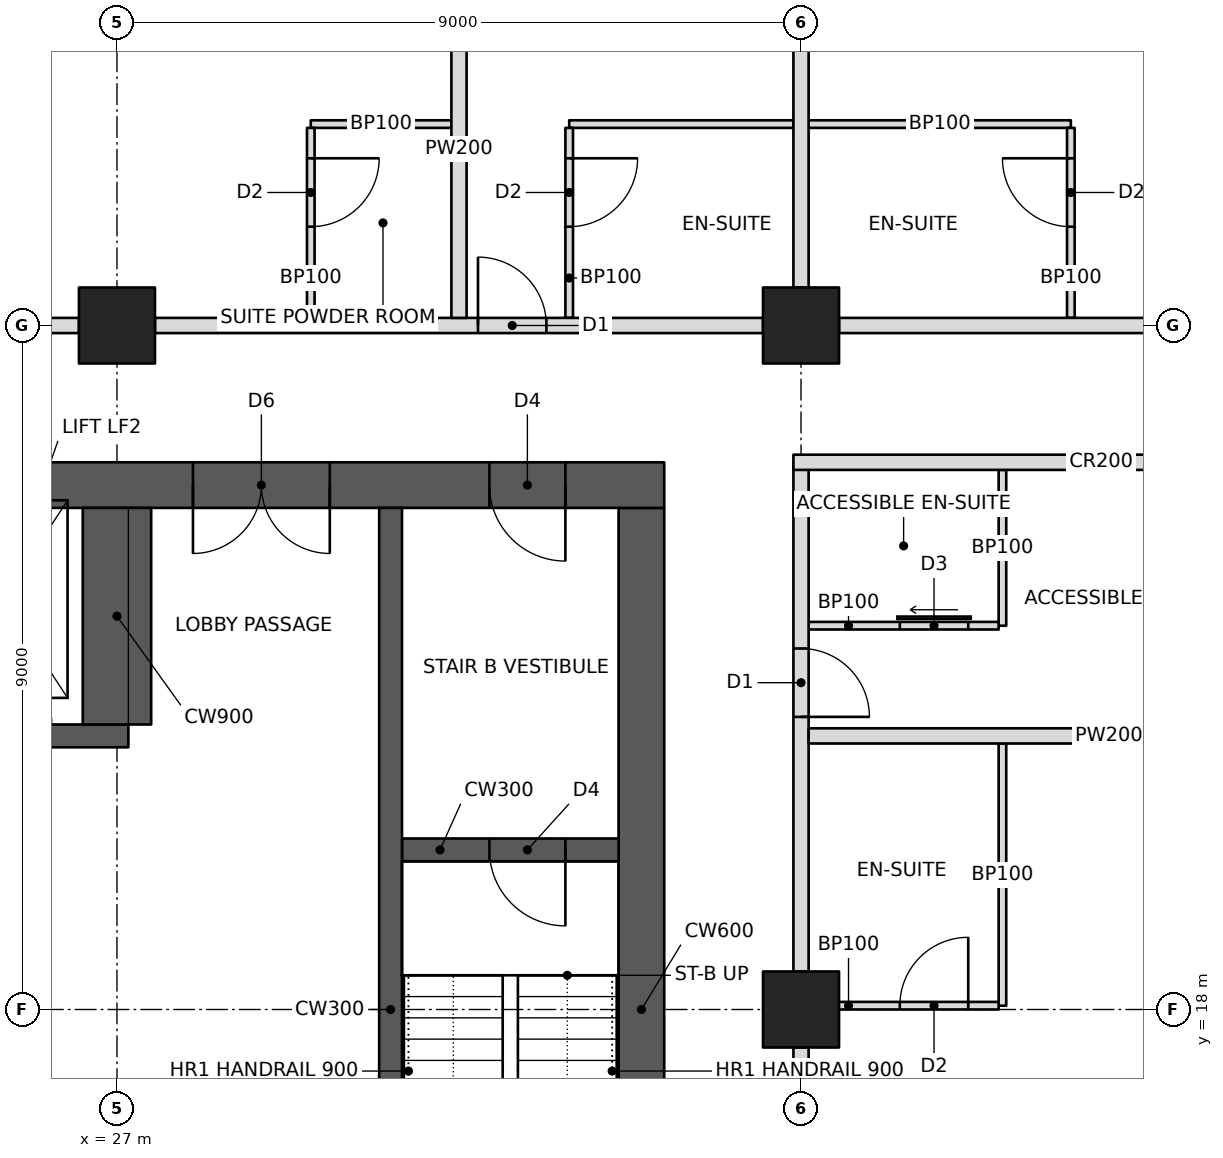
"""IFC4 building model, lengths in metres.
Left out: names, types, materials, properties, quantities, classifications, styles, units other than length and angle.
Written with IfcOpenShell. Run it as: python <this file> out.ifc"""

import sys

from ifc_helpers import new_model, si_unit, direction, frame, frame_2d, origin, origin_2d, place, context, subcontext, project, spatial, rectangle, hollow_rectangle, extrude, element, fill, save


model = new_model("IFC4")
c1 = context("Model", 3, precision=1e-05, world=origin(), true_north=direction((0.0, 1.0)))
c2 = subcontext(c1, "Body", "Model", "MODEL_VIEW")
j1 = project(units=[si_unit("LENGTHUNIT", "METRE"), si_unit("PLANEANGLEUNIT", "RADIAN")], contexts=[c1])
p1 = place(None, origin())
s1 = spatial("IfcSite", under=j1, at=p1, CompositionType="ELEMENT")
p2 = place(p1, origin())
s2 = spatial("IfcBuilding", under=s1, at=p2, CompositionType="ELEMENT")
p3 = place(p2, frame((0.0, 0.0, 152.0)))
s3 = spatial("IfcBuildingStorey", under=s2, at=p3, CompositionType="ELEMENT", Elevation=152.0)
for number, where, z_axis, x_axis in (
    (1, (27.0, 27.0, 0.0), (0.0, 0.0, 1.0), (1.0, 0.0, 0.0)),
    (2, (36.0, 18.0, 0.0), (0.0, 0.0, 1.0), (0.0, 1.0, 0.0)),
    (3, (36.0, 27.0, 0.0), (0.0, 0.0, 1.0), (1.0, 0.0, 0.0)),
):
    element("IfcColumn", number, at=place(p3, frame(where, z_axis=z_axis, x_axis=x_axis)), inside=s3, PredefinedType="COLUMN", context=c2, shape_type="SweptSolid", body=[
        extrude(hollow_rectangle(XDim=1.0, YDim=1.0, WallThickness=0.1, at=origin_2d()), origin(), (0.0, 0.0, 1.0), 3.4),
    ])
p4 = place(p3, frame((10.8, 24.9, 0.0), z_axis=(0.0, 0.0, 1.0), x_axis=(1.0, 0.0, 0.0)))
e4 = element("IfcWall", 4, at=p4, inside=s3, PredefinedType="SHEAR", context=c2, shape_type="SweptSolid", body=[
    extrude(rectangle(XDim=23.4, YDim=0.6, at=frame_2d((11.7, 0.0))), origin(), (0.0, 0.0, 1.0), 3.4),
])
p5 = place(p4, frame((17.2, 0.0, 0.0)))
e5 = element("IfcOpeningElement", 5, at=p5, cuts=e4, PredefinedType="OPENING", context=c2, shape_type="SweptSolid", body=[
    extrude(rectangle(XDim=1.8, YDim=2.1, at=frame_2d((0.9, 1.05))), frame((0.0, 0.31, 0.0), z_axis=(0.0, -1.0, 0.0), x_axis=(1.0, 0.0, 0.0)), (0.0, 0.0, 1.0), 0.62),
])
p6 = place(p4, frame((21.1, 0.0, 0.0)))
e6 = element("IfcOpeningElement", 6, at=p6, cuts=e4, PredefinedType="OPENING", context=c2, shape_type="SweptSolid", body=[
    extrude(rectangle(XDim=1.0, YDim=2.1, at=frame_2d((0.5, 1.05))), frame((0.0, 0.31, 0.0), z_axis=(0.0, -1.0, 0.0), x_axis=(1.0, 0.0, 0.0)), (0.0, 0.0, 1.0), 0.62),
])
p7 = place(p3, frame((33.9, 11.4, 0.0), z_axis=(0.0, 0.0, 1.0), x_axis=(0.0, 1.0, 0.0)))
e7 = element("IfcWall", 7, at=p7, inside=s3, PredefinedType="SHEAR", context=c2, shape_type="SweptSolid", body=[
    extrude(rectangle(XDim=13.2, YDim=0.6, at=frame_2d((6.6, 0.0))), origin(), (0.0, 0.0, 1.0), 3.4),
])
p8 = place(p3, frame((18.15, 21.6, 0.0), z_axis=(0.0, 0.0, 1.0), x_axis=(1.0, 0.0, 0.0)))
e8 = element("IfcWall", 8, at=p8, inside=s3, PredefinedType="SHEAR", context=c2, shape_type="SweptSolid", body=[
    extrude(rectangle(XDim=9.0, YDim=0.3, at=frame_2d((4.5, 0.0))), origin(), (0.0, 0.0, 1.0), 3.4),
])
p9 = place(p8, frame((6.75, 0.0, 0.0)))
e9 = element("IfcOpeningElement", 9, at=p9, cuts=e8, PredefinedType="OPENING", context=c2, shape_type="SweptSolid", body=[
    extrude(rectangle(XDim=1.2, YDim=2.1, at=frame_2d((0.6, 1.05))), frame((0.0, 0.16, 0.0), z_axis=(0.0, -1.0, 0.0), x_axis=(1.0, 0.0, 0.0)), (0.0, 0.0, 1.0), 0.32),
])
p10 = place(p3, frame((27.0, 21.75, 0.0), z_axis=(0.0, 0.0, 1.0), x_axis=(0.0, 1.0, 0.0)))
e10 = element("IfcWall", 10, at=p10, inside=s3, PredefinedType="SHEAR", context=c2, shape_type="SweptSolid", body=[
    extrude(rectangle(XDim=2.85, YDim=0.9, at=frame_2d((1.425, 0.0))), origin(), (0.0, 0.0, 1.0), 3.4),
])
p11 = place(p3, frame((30.6, 11.4, 0.0), z_axis=(0.0, 0.0, 1.0), x_axis=(0.0, 1.0, 0.0)))
e11 = element("IfcWall", 11, at=p11, inside=s3, PredefinedType="SHEAR", context=c2, shape_type="SweptSolid", body=[
    extrude(rectangle(XDim=13.2, YDim=0.3, at=frame_2d((6.6, 0.0))), origin(), (0.0, 0.0, 1.0), 3.4),
])
p12 = place(p3, frame((30.75, 20.1, 0.0), z_axis=(0.0, 0.0, 1.0), x_axis=(1.0, 0.0, 0.0)))
e12 = element("IfcWall", 12, at=p12, inside=s3, PredefinedType="SHEAR", context=c2, shape_type="SweptSolid", body=[
    extrude(rectangle(XDim=2.85, YDim=0.3, at=frame_2d((1.425, 0.0))), origin(), (0.0, 0.0, 1.0), 3.4),
])
p13 = place(p12, frame((1.15, 0.0, 0.0)))
e13 = element("IfcOpeningElement", 13, at=p13, cuts=e12, PredefinedType="OPENING", context=c2, shape_type="SweptSolid", body=[
    extrude(rectangle(XDim=1.0, YDim=2.1, at=frame_2d((0.5, 1.05))), frame((0.0, 0.16, 0.0), z_axis=(0.0, -1.0, 0.0), x_axis=(1.0, 0.0, 0.0)), (0.0, 0.0, 1.0), 0.32),
])
p14 = place(p3, frame((18.5, 27.0, 0.0), z_axis=(0.0, 0.0, 1.0), x_axis=(1.0, 0.0, 0.0)))
e14 = element("IfcWall", 14, at=p14, inside=s3, PredefinedType="PARTITIONING", context=c2, shape_type="SweptSolid", body=[
    extrude(rectangle(XDim=8.0, YDim=0.2, at=frame_2d((4.0, 0.0))), origin(), (0.0, 0.0, 1.0), 2.21),
])
p15 = place(p14, frame((2.85, 0.0, 0.0)))
e15 = element("IfcOpeningElement", 15, at=p15, cuts=e14, PredefinedType="OPENING", context=c2, shape_type="SweptSolid", body=[
    extrude(rectangle(XDim=0.9, YDim=2.1, at=frame_2d((0.45, 1.05))), frame((0.0, 0.11, 0.0), z_axis=(0.0, -1.0, 0.0), x_axis=(1.0, 0.0, 0.0)), (0.0, 0.0, 1.0), 0.22),
])
p16 = place(p14, frame((4.25, 0.0, 0.0)))
e16 = element("IfcOpeningElement", 16, at=p16, cuts=e14, PredefinedType="OPENING", context=c2, shape_type="SweptSolid", body=[
    extrude(rectangle(XDim=0.9, YDim=2.1, at=frame_2d((0.45, 1.05))), frame((0.0, 0.11, 0.0), z_axis=(0.0, -1.0, 0.0), x_axis=(1.0, 0.0, 0.0)), (0.0, 0.0, 1.0), 0.22),
])
p17 = place(p3, frame((27.5, 27.0, 0.0), z_axis=(0.0, 0.0, 1.0), x_axis=(1.0, 0.0, 0.0)))
e17 = element("IfcWall", 17, at=p17, inside=s3, PredefinedType="PARTITIONING", context=c2, shape_type="SweptSolid", body=[
    extrude(rectangle(XDim=8.0, YDim=0.2, at=frame_2d((4.0, 0.0))), origin(), (0.0, 0.0, 1.0), 2.21),
])
p18 = place(p17, frame((4.25, 0.0, 0.0)))
e18 = element("IfcOpeningElement", 18, at=p18, cuts=e17, PredefinedType="OPENING", context=c2, shape_type="SweptSolid", body=[
    extrude(rectangle(XDim=0.9, YDim=2.1, at=frame_2d((0.45, 1.05))), frame((0.0, 0.11, 0.0), z_axis=(0.0, -1.0, 0.0), x_axis=(1.0, 0.0, 0.0)), (0.0, 0.0, 1.0), 0.22),
])
p19 = place(p3, frame((36.5, 27.0, 0.0), z_axis=(0.0, 0.0, 1.0), x_axis=(1.0, 0.0, 0.0)))
e19 = element("IfcWall", 19, at=p19, inside=s3, PredefinedType="PARTITIONING", context=c2, shape_type="SweptSolid", body=[
    extrude(rectangle(XDim=7.5, YDim=0.2, at=frame_2d((3.75, 0.0))), origin(), (0.0, 0.0, 1.0), 2.21),
])
p20 = place(p19, frame((6.35, 0.0, 0.0)))
e20 = element("IfcOpeningElement", 20, at=p20, cuts=e19, PredefinedType="OPENING", context=c2, shape_type="SweptSolid", body=[
    extrude(rectangle(XDim=0.9, YDim=2.1, at=frame_2d((0.45, 1.05))), frame((0.0, 0.11, 0.0), z_axis=(0.0, -1.0, 0.0), x_axis=(1.0, 0.0, 0.0)), (0.0, 0.0, 1.0), 0.22),
])
p21 = place(p3, frame((36.0, 10.8, 0.0), z_axis=(0.0, 0.0, 1.0), x_axis=(0.0, 1.0, 0.0)))
e21 = element("IfcWall", 21, at=p21, inside=s3, PredefinedType="PARTITIONING", context=c2, shape_type="SweptSolid", body=[
    extrude(rectangle(XDim=6.7, YDim=0.2, at=frame_2d((3.35, 0.0))), origin(), (0.0, 0.0, 1.0), 2.21),
])
p22 = place(p21, frame((0.25, 0.0, 0.0)))
e22 = element("IfcOpeningElement", 22, at=p22, cuts=e21, PredefinedType="OPENING", context=c2, shape_type="SweptSolid", body=[
    extrude(rectangle(XDim=0.9, YDim=2.1, at=frame_2d((0.45, 1.05))), frame((0.0, 0.11, 0.0), z_axis=(0.0, -1.0, 0.0), x_axis=(1.0, 0.0, 0.0)), (0.0, 0.0, 1.0), 0.22),
])
p23 = place(p3, frame((36.0, 18.5, 0.0), z_axis=(0.0, 0.0, 1.0), x_axis=(0.0, 1.0, 0.0)))
e23 = element("IfcWall", 23, at=p23, inside=s3, PredefinedType="PARTITIONING", context=c2, shape_type="SweptSolid", body=[
    extrude(rectangle(XDim=6.7, YDim=0.2, at=frame_2d((3.35, 0.0))), origin(), (0.0, 0.0, 1.0), 2.21),
])
p24 = place(p23, frame((3.35, 0.0, 0.0)))
e24 = element("IfcOpeningElement", 24, at=p24, cuts=e23, PredefinedType="OPENING", context=c2, shape_type="SweptSolid", body=[
    extrude(rectangle(XDim=0.9, YDim=2.1, at=frame_2d((0.45, 1.05))), frame((0.0, 0.11, 0.0), z_axis=(0.0, -1.0, 0.0), x_axis=(1.0, 0.0, 0.0)), (0.0, 0.0, 1.0), 0.22),
])
p25 = place(p3, frame((35.9, 25.2, 0.0), z_axis=(0.0, 0.0, 1.0), x_axis=(1.0, 0.0, 0.0)))
e25 = element("IfcWall", 25, at=p25, inside=s3, PredefinedType="PARTITIONING", context=c2, shape_type="SweptSolid", body=[
    extrude(rectangle(XDim=8.1, YDim=0.2, at=frame_2d((4.05, 0.0))), origin(), (0.0, 0.0, 1.0), 2.21),
])
p26 = place(p3, frame((31.5, 27.1, 0.0), z_axis=(0.0, 0.0, 1.0), x_axis=(0.0, 1.0, 0.0)))
e26 = element("IfcWall", 26, at=p26, inside=s3, PredefinedType="PARTITIONING", context=c2, shape_type="SweptSolid", body=[
    extrude(rectangle(XDim=7.9, YDim=0.2, at=frame_2d((3.95, 0.0))), origin(), (0.0, 0.0, 1.0), 2.21),
])
p27 = place(p26, frame((4.6, 0.0, 0.0)))
e27 = element("IfcOpeningElement", 27, at=p27, cuts=e26, PredefinedType="OPENING", context=c2, shape_type="SweptSolid", body=[
    extrude(rectangle(XDim=1.0, YDim=2.1, at=frame_2d((0.5, 1.05))), frame((0.0, 0.11, 0.0), z_axis=(0.0, -1.0, 0.0), x_axis=(1.0, 0.0, 0.0)), (0.0, 0.0, 1.0), 0.22),
])
p28 = place(p3, frame((36.0, 27.5, 0.0), z_axis=(0.0, 0.0, 1.0), x_axis=(0.0, 1.0, 0.0)))
e28 = element("IfcWall", 28, at=p28, inside=s3, PredefinedType="PARTITIONING", context=c2, shape_type="SweptSolid", body=[
    extrude(rectangle(XDim=7.5, YDim=0.2, at=frame_2d((3.75, 0.0))), origin(), (0.0, 0.0, 1.0), 2.21),
])
p29 = place(p3, frame((29.55, 29.65, 0.0), z_axis=(0.0, 0.0, 1.0), x_axis=(1.0, 0.0, 0.0)))
e29 = element("IfcWall", 29, at=p29, inside=s3, PredefinedType="PARTITIONING", context=c2, shape_type="SweptSolid", body=[
    extrude(rectangle(XDim=1.85, YDim=0.1, at=frame_2d((0.925, 0.0))), origin(), (0.0, 0.0, 1.0), 3.15),
])
p30 = place(p3, frame((29.55, 27.1, 0.0), z_axis=(0.0, 0.0, 1.0), x_axis=(0.0, 1.0, 0.0)))
e30 = element("IfcWall", 30, at=p30, inside=s3, PredefinedType="PARTITIONING", context=c2, shape_type="SweptSolid", body=[
    extrude(rectangle(XDim=2.5, YDim=0.1, at=frame_2d((1.25, 0.0))), origin(), (0.0, 0.0, 1.0), 2.21),
])
p31 = place(p30, frame((1.2, 0.0, 0.0)))
e31 = element("IfcOpeningElement", 31, at=p31, cuts=e30, PredefinedType="OPENING", context=c2, shape_type="SweptSolid", body=[
    extrude(rectangle(XDim=0.9, YDim=2.1, at=frame_2d((0.45, 1.05))), frame((0.0, 0.06, 0.0), z_axis=(0.0, -1.0, 0.0), x_axis=(1.0, 0.0, 0.0)), (0.0, 0.0, 1.0), 0.12),
])
p32 = place(p3, frame((32.95, 29.65, 0.0), z_axis=(0.0, 0.0, 1.0), x_axis=(1.0, 0.0, 0.0)))
e32 = element("IfcWall", 32, at=p32, inside=s3, PredefinedType="PARTITIONING", context=c2, shape_type="SweptSolid", body=[
    extrude(rectangle(XDim=2.95, YDim=0.1, at=frame_2d((1.475, 0.0))), origin(), (0.0, 0.0, 1.0), 2.21),
])
p33 = place(p3, frame((32.95, 27.1, 0.0), z_axis=(0.0, 0.0, 1.0), x_axis=(0.0, 1.0, 0.0)))
e33 = element("IfcWall", 33, at=p33, inside=s3, PredefinedType="PARTITIONING", context=c2, shape_type="SweptSolid", body=[
    extrude(rectangle(XDim=2.5, YDim=0.1, at=frame_2d((1.25, 0.0))), origin(), (0.0, 0.0, 1.0), 2.21),
])
p34 = place(p33, frame((1.2, 0.0, 0.0)))
e34 = element("IfcOpeningElement", 34, at=p34, cuts=e33, PredefinedType="OPENING", context=c2, shape_type="SweptSolid", body=[
    extrude(rectangle(XDim=0.9, YDim=2.1, at=frame_2d((0.45, 1.05))), frame((0.0, 0.06, 0.0), z_axis=(0.0, -1.0, 0.0), x_axis=(1.0, 0.0, 0.0)), (0.0, 0.0, 1.0), 0.12),
])
p35 = place(p3, frame((36.1, 29.65, 0.0), z_axis=(0.0, 0.0, 1.0), x_axis=(1.0, 0.0, 0.0)))
e35 = element("IfcWall", 35, at=p35, inside=s3, PredefinedType="PARTITIONING", context=c2, shape_type="SweptSolid", body=[
    extrude(rectangle(XDim=3.45, YDim=0.1, at=frame_2d((1.725, 0.0))), origin(), (0.0, 0.0, 1.0), 2.21),
])
p36 = place(p3, frame((39.55, 27.1, 0.0), z_axis=(0.0, 0.0, 1.0), x_axis=(0.0, 1.0, 0.0)))
e36 = element("IfcWall", 36, at=p36, inside=s3, PredefinedType="PARTITIONING", context=c2, shape_type="SweptSolid", body=[
    extrude(rectangle(XDim=2.5, YDim=0.1, at=frame_2d((1.25, 0.0))), origin(), (0.0, 0.0, 1.0), 2.21),
])
p37 = place(p36, frame((1.2, 0.0, 0.0)))
e37 = element("IfcOpeningElement", 37, at=p37, cuts=e36, PredefinedType="OPENING", context=c2, shape_type="SweptSolid", body=[
    extrude(rectangle(XDim=0.9, YDim=2.1, at=frame_2d((0.45, 1.05))), frame((0.0, 0.06, 0.0), z_axis=(0.0, -1.0, 0.0), x_axis=(1.0, 0.0, 0.0)), (0.0, 0.0, 1.0), 0.12),
])
p38 = place(p3, frame((36.1, 21.6, 0.0), z_axis=(0.0, 0.0, 1.0), x_axis=(1.0, 0.0, 0.0)))
e38 = element("IfcWall", 38, at=p38, inside=s3, PredefinedType="PARTITIONING", context=c2, shape_type="SweptSolid", body=[
    extrude(rectangle(XDim=7.9, YDim=0.2, at=frame_2d((3.95, 0.0))), origin(), (0.0, 0.0, 1.0), 2.21),
])
p39 = place(p3, frame((38.65, 18.05, 0.0), z_axis=(0.0, 0.0, 1.0), x_axis=(0.0, 1.0, 0.0)))
e39 = element("IfcWall", 39, at=p39, inside=s3, PredefinedType="PARTITIONING", context=c2, shape_type="SweptSolid", body=[
    extrude(rectangle(XDim=3.45, YDim=0.1, at=frame_2d((1.725, 0.0))), origin(), (0.0, 0.0, 1.0), 2.202),
])
p40 = place(p3, frame((36.1, 18.05, 0.0), z_axis=(0.0, 0.0, 1.0), x_axis=(1.0, 0.0, 0.0)))
e40 = element("IfcWall", 40, at=p40, inside=s3, PredefinedType="PARTITIONING", context=c2, shape_type="SweptSolid", body=[
    extrude(rectangle(XDim=2.5, YDim=0.1, at=frame_2d((1.25, 0.0))), origin(), (0.0, 0.0, 1.0), 2.203),
])
p41 = place(p40, frame((1.2, 0.0, 0.0)))
e41 = element("IfcOpeningElement", 41, at=p41, cuts=e40, PredefinedType="OPENING", context=c2, shape_type="SweptSolid", body=[
    extrude(rectangle(XDim=0.9, YDim=2.1, at=frame_2d((0.45, 1.05))), frame((0.0, 0.06, 0.0), z_axis=(0.0, -1.0, 0.0), x_axis=(1.0, 0.0, 0.0)), (0.0, 0.0, 1.0), 0.12),
])
p42 = place(p3, frame((38.65, 23.05, 0.0), z_axis=(0.0, 0.0, 1.0), x_axis=(0.0, 1.0, 0.0)))
e42 = element("IfcWall", 42, at=p42, inside=s3, PredefinedType="PARTITIONING", context=c2, shape_type="SweptSolid", body=[
    extrude(rectangle(XDim=2.05, YDim=0.1, at=frame_2d((1.025, 0.0))), origin(), (0.0, 0.0, 1.0), 3.15),
])
p43 = place(p3, frame((36.1, 23.05, 0.0), z_axis=(0.0, 0.0, 1.0), x_axis=(1.0, 0.0, 0.0)))
e43 = element("IfcWall", 43, at=p43, inside=s3, PredefinedType="PARTITIONING", context=c2, shape_type="SweptSolid", body=[
    extrude(rectangle(XDim=2.5, YDim=0.1, at=frame_2d((1.25, 0.0))), origin(), (0.0, 0.0, 1.0), 2.21),
])
p44 = place(p43, frame((1.2, 0.0, 0.0)))
e44 = element("IfcOpeningElement", 44, at=p44, cuts=e43, PredefinedType="OPENING", context=c2, shape_type="SweptSolid", body=[
    extrude(rectangle(XDim=0.9, YDim=2.1, at=frame_2d((0.45, 1.05))), frame((0.0, 0.06, 0.0), z_axis=(0.0, -1.0, 0.0), x_axis=(1.0, 0.0, 0.0)), (0.0, 0.0, 1.0), 0.12),
])
p45 = place(p31, frame((0.9, 0.0, 0.0), z_axis=(0.0, 0.0, 1.0), x_axis=(-1.0, 0.0, 0.0)))
e45 = element("IfcDoor", 45, at=p45, inside=s3, OperationType="SINGLE_SWING_LEFT", PredefinedType="DOOR", context=c2, shape_type="SweptSolid", body=[
    extrude(rectangle(XDim=0.9, YDim=2.1, at=frame_2d((0.45, 1.05))), frame((0.0, 0.025, 0.0), z_axis=(0.0, -1.0, 0.0), x_axis=(1.0, 0.0, 0.0)), (0.0, 0.0, 1.0), 0.05),
])
fill(e31, e45)
p46 = place(p34, frame((0.9, 0.0, 0.0), z_axis=(0.0, 0.0, 1.0), x_axis=(-1.0, 0.0, 0.0)))
e46 = element("IfcDoor", 46, at=p46, inside=s3, OperationType="SINGLE_SWING_LEFT", PredefinedType="DOOR", context=c2, shape_type="SweptSolid", body=[
    extrude(rectangle(XDim=0.9, YDim=2.1, at=frame_2d((0.45, 1.05))), frame((0.0, 0.025, 0.0), z_axis=(0.0, -1.0, 0.0), x_axis=(1.0, 0.0, 0.0)), (0.0, 0.0, 1.0), 0.05),
])
fill(e34, e46)
p47 = place(p18, origin())
e47 = element("IfcDoor", 47, at=p47, inside=s3, OperationType="SINGLE_SWING_LEFT", PredefinedType="DOOR", context=c2, shape_type="SweptSolid", body=[
    extrude(rectangle(XDim=0.9, YDim=2.1, at=frame_2d((0.45, 1.05))), frame((0.0, 0.025, 0.0), z_axis=(0.0, -1.0, 0.0), x_axis=(1.0, 0.0, 0.0)), (0.0, 0.0, 1.0), 0.05),
])
fill(e18, e47)
p48 = place(p37, origin())
e48 = element("IfcDoor", 48, at=p48, inside=s3, OperationType="SINGLE_SWING_RIGHT", PredefinedType="DOOR", context=c2, shape_type="SweptSolid", body=[
    extrude(rectangle(XDim=0.9, YDim=2.1, at=frame_2d((0.45, 1.05))), frame((0.0, 0.025, 0.0), z_axis=(0.0, -1.0, 0.0), x_axis=(1.0, 0.0, 0.0)), (0.0, 0.0, 1.0), 0.05),
])
fill(e37, e48)
p49 = place(p41, origin())
e49 = element("IfcDoor", 49, at=p49, inside=s3, OperationType="SINGLE_SWING_RIGHT", PredefinedType="DOOR", context=c2, shape_type="SweptSolid", body=[
    extrude(rectangle(XDim=0.9, YDim=2.1, at=frame_2d((0.45, 1.05))), frame((0.0, 0.025, 0.0), z_axis=(0.0, -1.0, 0.0), x_axis=(1.0, 0.0, 0.0)), (0.0, 0.0, 1.0), 0.05),
])
fill(e41, e49)
p50 = place(p44, origin())
e50 = element("IfcDoor", 50, at=p50, inside=s3, OperationType="SLIDING_TO_LEFT", PredefinedType="DOOR", context=c2, shape_type="SweptSolid", body=[
    extrude(rectangle(XDim=0.9, YDim=2.1, at=frame_2d((0.45, 1.05))), frame((0.0, 0.025, 0.0), z_axis=(0.0, -1.0, 0.0), x_axis=(1.0, 0.0, 0.0)), (0.0, 0.0, 1.0), 0.05),
])
fill(e44, e50)
p51 = place(p24, frame((0.9, 0.0, 0.0), z_axis=(0.0, 0.0, 1.0), x_axis=(-1.0, 0.0, 0.0)))
e51 = element("IfcDoor", 51, at=p51, inside=s3, OperationType="SINGLE_SWING_RIGHT", PredefinedType="DOOR", context=c2, shape_type="SweptSolid", body=[
    extrude(rectangle(XDim=0.9, YDim=2.1, at=frame_2d((0.45, 1.05))), frame((0.0, 0.025, 0.0), z_axis=(0.0, -1.0, 0.0), x_axis=(1.0, 0.0, 0.0)), (0.0, 0.0, 1.0), 0.05),
])
fill(e24, e51)
p52 = place(p5, frame((1.8, 0.0, 0.0), z_axis=(0.0, 0.0, 1.0), x_axis=(-1.0, 0.0, 0.0)))
e52 = element("IfcDoor", 52, at=p52, inside=s3, OperationType="DOUBLE_DOOR_SINGLE_SWING", PredefinedType="DOOR", context=c2, shape_type="SweptSolid", body=[
    extrude(rectangle(XDim=1.8, YDim=2.1, at=frame_2d((0.9, 1.05))), frame((0.0, 0.025, 0.0), z_axis=(0.0, -1.0, 0.0), x_axis=(1.0, 0.0, 0.0)), (0.0, 0.0, 1.0), 0.05),
])
fill(e5, e52)
p53 = place(p6, frame((1.0, 0.0, 0.0), z_axis=(0.0, 0.0, 1.0), x_axis=(-1.0, 0.0, 0.0)))
e53 = element("IfcDoor", 53, at=p53, inside=s3, OperationType="SINGLE_SWING_LEFT", PredefinedType="DOOR", context=c2, shape_type="SweptSolid", body=[
    extrude(rectangle(XDim=1.0, YDim=2.1, at=frame_2d((0.5, 1.05))), frame((0.0, 0.025, 0.0), z_axis=(0.0, -1.0, 0.0), x_axis=(1.0, 0.0, 0.0)), (0.0, 0.0, 1.0), 0.05),
])
fill(e6, e53)
p54 = place(p13, frame((1.0, 0.0, 0.0), z_axis=(0.0, 0.0, 1.0), x_axis=(-1.0, 0.0, 0.0)))
e54 = element("IfcDoor", 54, at=p54, inside=s3, OperationType="SINGLE_SWING_LEFT", PredefinedType="DOOR", context=c2, shape_type="SweptSolid", body=[
    extrude(rectangle(XDim=1.0, YDim=2.1, at=frame_2d((0.5, 1.05))), frame((0.0, 0.025, 0.0), z_axis=(0.0, -1.0, 0.0), x_axis=(1.0, 0.0, 0.0)), (0.0, 0.0, 1.0), 0.05),
])
fill(e13, e54)
save(model, sys.argv[1])
